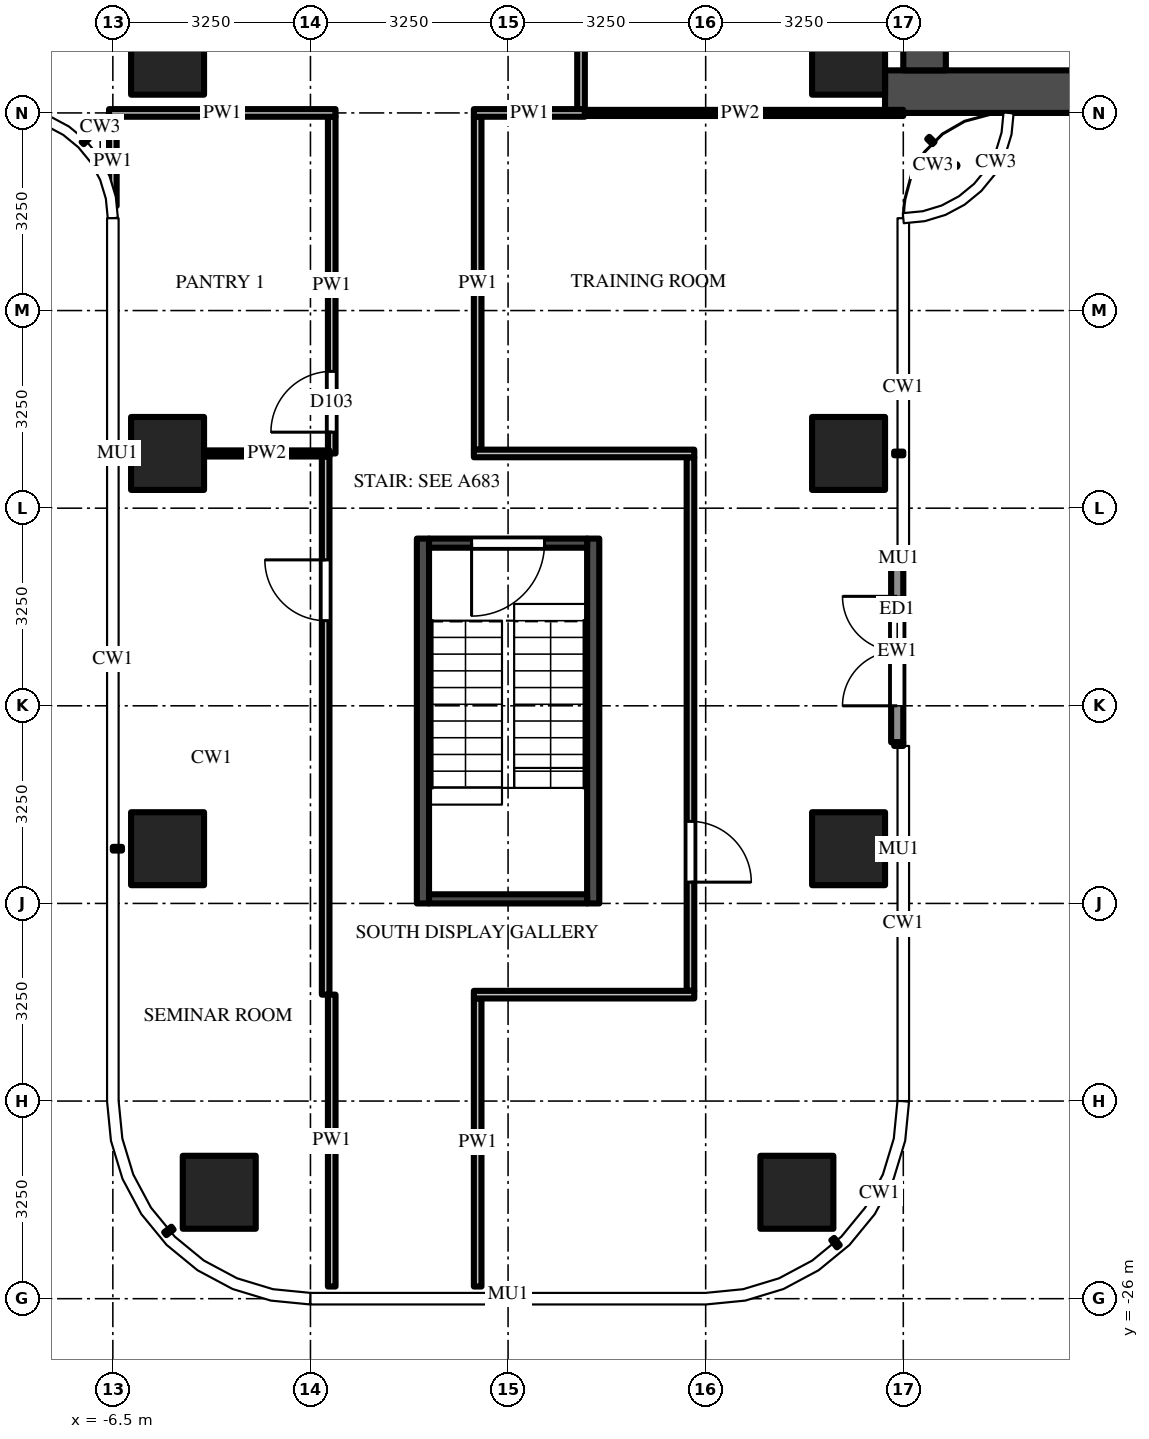
"""IFC4 building model, lengths in metres.
Left out: names, types, materials, properties, quantities, classifications, styles, units other than length and angle.
Written with IfcOpenShell. Run it as: python <this file> out.ifc"""

import sys

from ifc_helpers import new_model, si_unit, direction, frame, frame_2d, origin, origin_2d, place, context, subcontext, project, spatial, rectangle, extrude, source, transform, mapped, element, fill, save


model = new_model("IFC4")
c1 = context("Model", 3, precision=1e-05, world=origin(), true_north=direction((0.0, 1.0)))
c2 = subcontext(c1, "Body", "Model", "MODEL_VIEW")
j1 = project(units=[si_unit("LENGTHUNIT", "METRE"), si_unit("PLANEANGLEUNIT", "RADIAN")], contexts=[c1])
p1 = place(None, origin())
s1 = spatial("IfcSite", under=j1, at=p1, CompositionType="ELEMENT")
p2 = place(p1, origin())
s2 = spatial("IfcBuilding", under=s1, at=p2, CompositionType="ELEMENT")
p3 = place(p2, frame((0.0, 0.0, 162.0)))
s3 = spatial("IfcBuildingStorey", under=s2, at=p3, CompositionType="ELEMENT", Elevation=162.0)
m1 = source(origin(), c2, "Body", "SweptSolid", [
    extrude(rectangle(XDim=1.2, YDim=1.2, at=origin_2d()), origin(), (0.0, 0.0, 1.0), 3.9),
])
for number, where, z_axis, x_axis in (
    (1, (5.6, -5.6, 0.0), (0.0, 0.0, 1.0), (1.0, 0.0, 0.0)),
    (2, (-5.6, -5.6, 0.0), (0.0, 0.0, 1.0), (1.0, 0.0, 0.0)),
    (3, (5.6, -12.1, 0.0), (0.0, 0.0, 1.0), (1.0, 0.0, 0.0)),
    (4, (5.6, -18.6, 0.0), (0.0, 0.0, 1.0), (1.0, 0.0, 0.0)),
    (5, (4.75, -24.25, 0.0), (0.0, 0.0, 1.0), (1.0, 0.0, 0.0)),
    (6, (-5.6, -12.1, 0.0), (0.0, 0.0, 1.0), (1.0, 0.0, 0.0)),
    (7, (-5.6, -18.6, 0.0), (0.0, 0.0, 1.0), (1.0, 0.0, 0.0)),
    (8, (-4.75, -24.25, 0.0), (0.0, 0.0, 1.0), (1.0, 0.0, 0.0)),
):
    element("IfcColumn", number, at=place(p3, frame(where, z_axis=z_axis, x_axis=x_axis)), inside=s3, PredefinedType="COLUMN", context=c2, shape_type="MappedRepresentation", body=[
        mapped(m1, transform((0.0, 0.0, 0.0))),
    ])
m2 = source(origin(), c2, "Body", "SweptSolid", [
    extrude(rectangle(XDim=16.55, YDim=0.7, at=frame_2d((8.275, 0.0))), origin(), (0.0, 0.0, 1.0), 3.7),
])
p4 = place(p3, frame((6.2, -6.15, 0.0), z_axis=(0.0, 0.0, 1.0), x_axis=(1.0, 0.0, 0.0)))
e9 = element("IfcWall", 9, at=p4, inside=s3, PredefinedType="SHEAR", context=c2, shape_type="MappedRepresentation", body=[
    mapped(m2, transform((0.0, 0.0, 0.0))),
])
m3 = source(origin(), c2, "Body", "SweptSolid", [
    extrude(rectangle(XDim=9.05, YDim=0.7, at=frame_2d((4.525, 0.0))), origin(), (0.0, 0.0, 1.0), 3.7),
])
p5 = place(p3, frame((6.85, -5.8, 0.0), z_axis=(0.0, 0.0, 1.0), x_axis=(0.0, 1.0, 0.0)))
e10 = element("IfcWall", 10, at=p5, inside=s3, PredefinedType="SHEAR", context=c2, shape_type="MappedRepresentation", body=[
    mapped(m3, transform((0.0, 0.0, 0.0))),
])
m4 = source(origin(), c2, "Body", "SweptSolid", [
    extrude(rectangle(XDim=1.8, YDim=2.1, at=frame_2d((0.9, 1.05))), frame((0.0, 0.36, 0.0), z_axis=(0.0, -1.0, 0.0), x_axis=(1.0, 0.0, 0.0)), (0.0, 0.0, 1.0), 0.72),
])
p6 = place(p5, frame((3.15, 0.0, 0.0)))
e11 = element("IfcOpeningElement", 11, at=p6, cuts=e10, PredefinedType="OPENING", context=c2, shape_type="MappedRepresentation", body=[
    mapped(m4, transform((0.0, 0.0, 0.0))),
])
m5 = source(origin(), c2, "Body", "SweptSolid", [
    extrude(rectangle(XDim=6.0, YDim=0.2, at=frame_2d((3.0, 0.0))), origin(), (0.0, 0.0, 1.0), 3.7),
])
for number, where, z_axis, x_axis in (
    (12, (1.4, -13.5, 0.0), (0.0, 0.0, 1.0), (0.0, -1.0, 0.0)),
    (13, (-1.4, -13.5, 0.0), (0.0, 0.0, 1.0), (0.0, -1.0, 0.0)),
):
    element("IfcWall", number, at=place(p3, frame(where, z_axis=z_axis, x_axis=x_axis)), inside=s3, PredefinedType="SHEAR", context=c2, shape_type="MappedRepresentation", body=[
        mapped(m5, transform((0.0, 0.0, 0.0))),
    ])
m6 = source(origin(), c2, "Body", "SweptSolid", [
    extrude(rectangle(XDim=2.6, YDim=0.15, at=frame_2d((1.3, 0.0))), origin(), (0.0, 0.0, 1.0), 3.7),
])
p7 = place(p3, frame((1.3, -13.575, 0.0), z_axis=(0.0, 0.0, 1.0), x_axis=(-1.0, 0.0, 0.0)))
e14 = element("IfcWall", 14, at=p7, inside=s3, PredefinedType="SHEAR", context=c2, shape_type="MappedRepresentation", body=[
    mapped(m6, transform((0.0, 0.0, 0.0))),
])
m7 = source(origin(), c2, "Body", "SweptSolid", [
    extrude(rectangle(XDim=1.2, YDim=2.1, at=frame_2d((0.6, 1.05))), frame((0.0, 0.085, 0.0), z_axis=(0.0, -1.0, 0.0), x_axis=(1.0, 0.0, 0.0)), (0.0, 0.0, 1.0), 0.17),
])
p8 = place(p7, frame((0.7, 0.0, 0.0)))
e15 = element("IfcOpeningElement", 15, at=p8, cuts=e14, PredefinedType="OPENING", context=c2, shape_type="MappedRepresentation", body=[
    mapped(m7, transform((0.0, 0.0, 0.0))),
])
p9 = place(p3, frame((1.3, -19.425, 0.0), z_axis=(0.0, 0.0, 1.0), x_axis=(-1.0, 0.0, 0.0)))
e16 = element("IfcWall", 16, at=p9, inside=s3, PredefinedType="SHEAR", context=c2, shape_type="MappedRepresentation", body=[
    mapped(m6, transform((0.0, 0.0, 0.0))),
])
m8 = source(origin(), c2, "Body", "SweptSolid", [
    extrude(rectangle(XDim=3.0, YDim=0.2, at=frame_2d((1.5, 0.0))), origin(), (0.0, 0.0, 1.0), 3.7),
])
p10 = place(p3, frame((6.4, -16.85, 0.0), z_axis=(0.0, 0.0, 1.0), x_axis=(0.0, 1.0, 0.0)))
e17 = element("IfcWall", 17, at=p10, inside=s3, PredefinedType="SOLIDWALL", context=c2, shape_type="MappedRepresentation", body=[
    mapped(m8, transform((0.0, 0.0, 0.0))),
])
m9 = source(origin(), c2, "Body", "SweptSolid", [
    extrude(rectangle(XDim=1.8, YDim=2.4, at=frame_2d((0.9, 1.2))), frame((0.0, 0.11, 0.0), z_axis=(0.0, -1.0, 0.0), x_axis=(1.0, 0.0, 0.0)), (0.0, 0.0, 1.0), 0.22),
])
p11 = place(p10, frame((0.6, 0.0, 0.0)))
e18 = element("IfcOpeningElement", 18, at=p11, cuts=e17, PredefinedType="OPENING", context=c2, shape_type="MappedRepresentation", body=[
    mapped(m9, transform((0.0, 0.0, 0.0))),
])
m10 = source(origin(), c2, "Body", "SweptSolid", [
    extrude(rectangle(XDim=1.469, YDim=0.125, at=frame_2d((0.734, 0.0))), origin(), (0.0, 0.0, 1.0), 3.7),
])
p12 = place(p3, frame((-6.5, -6.562, 0.0), z_axis=(0.0, 0.0, 1.0), x_axis=(0.0, -1.0, 0.0)))
e19 = element("IfcWall", 19, at=p12, inside=s3, PredefinedType="PARTITIONING", context=c2, shape_type="MappedRepresentation", body=[
    mapped(m10, transform((0.0, 0.0, 0.0))),
])
m11 = source(origin(), c2, "Body", "SweptSolid", [
    extrude(rectangle(XDim=8.85, YDim=0.125, at=frame_2d((4.425, 0.0))), origin(), (0.0, 0.0, 1.0), 2.997),
])
p13 = place(p3, frame((-3.0, -21.0, 0.0), z_axis=(0.0, 0.0, 1.0), x_axis=(0.0, 1.0, 0.0)))
e20 = element("IfcWall", 20, at=p13, inside=s3, PredefinedType="PARTITIONING", context=c2, shape_type="MappedRepresentation", body=[
    mapped(m11, transform((0.0, 0.0, 0.0))),
])
m12 = source(origin(), c2, "Body", "SweptSolid", [
    extrude(rectangle(XDim=1.0, YDim=2.1, at=frame_2d((0.5, 1.05))), frame((0.0, 0.073, 0.0), z_axis=(0.0, -1.0, 0.0), x_axis=(1.0, 0.0, 0.0)), (0.0, 0.0, 1.0), 0.145),
])
p14 = place(p13, frame((6.15, 0.0, 0.0)))
e21 = element("IfcOpeningElement", 21, at=p14, cuts=e20, PredefinedType="OPENING", context=c2, shape_type="MappedRepresentation", body=[
    mapped(m12, transform((0.0, 0.0, 0.0))),
])
m13 = source(origin(), c2, "Body", "SweptSolid", [
    extrude(rectangle(XDim=4.8, YDim=0.125, at=frame_2d((2.4, 0.0))), origin(), (0.0, 0.0, 1.0), 2.78),
])
p15 = place(p3, frame((-2.9, -25.8, 0.0), z_axis=(0.0, 0.0, 1.0), x_axis=(0.0, 1.0, 0.0)))
e22 = element("IfcWall", 22, at=p15, inside=s3, PredefinedType="PARTITIONING", context=c2, shape_type="MappedRepresentation", body=[
    mapped(m13, transform((0.0, 0.0, 0.0))),
])
m14 = source(origin(), c2, "Body", "SweptSolid", [
    extrude(rectangle(XDim=5.538, YDim=0.125, at=frame_2d((2.769, 0.0))), origin(), (0.0, 0.0, 1.0), 2.997),
])
p16 = place(p3, frame((-2.9, -12.1, 0.0), z_axis=(0.0, 0.0, 1.0), x_axis=(0.0, 1.0, 0.0)))
e23 = element("IfcWall", 23, at=p16, inside=s3, PredefinedType="PARTITIONING", context=c2, shape_type="MappedRepresentation", body=[
    mapped(m14, transform((0.0, 0.0, 0.0))),
])
p17 = place(p16, frame((0.35, 0.0, 0.0)))
e24 = element("IfcOpeningElement", 24, at=p17, cuts=e23, PredefinedType="OPENING", context=c2, shape_type="MappedRepresentation", body=[
    mapped(m12, transform((0.0, 0.0, 0.0))),
])
m15 = source(origin(), c2, "Body", "SweptSolid", [
    extrude(rectangle(XDim=4.738, YDim=0.125, at=frame_2d((2.369, 0.0))), origin(), (0.0, 0.0, 1.0), 2.78),
])
p18 = place(p3, frame((-0.5, -21.062, 0.0), z_axis=(0.0, 0.0, 1.0), x_axis=(0.0, -1.0, 0.0)))
e25 = element("IfcWall", 25, at=p18, inside=s3, PredefinedType="PARTITIONING", context=c2, shape_type="MappedRepresentation", body=[
    mapped(m15, transform((0.0, 0.0, 0.0))),
])
m16 = source(origin(), c2, "Body", "SweptSolid", [
    extrude(rectangle(XDim=5.475, YDim=0.125, at=frame_2d((2.738, 0.0))), origin(), (0.0, 0.0, 1.0), 2.997),
])
p19 = place(p3, frame((-0.5, -6.562, 0.0), z_axis=(0.0, 0.0, 1.0), x_axis=(0.0, -1.0, 0.0)))
e26 = element("IfcWall", 26, at=p19, inside=s3, PredefinedType="PARTITIONING", context=c2, shape_type="MappedRepresentation", body=[
    mapped(m16, transform((0.0, 0.0, 0.0))),
])
m17 = source(origin(), c2, "Body", "SweptSolid", [
    extrude(rectangle(XDim=3.137, YDim=0.125, at=frame_2d((1.569, 0.0))), origin(), (0.0, 0.0, 1.0), 2.997),
])
p20 = place(p3, frame((1.2, -3.312, 0.0), z_axis=(0.0, 0.0, 1.0), x_axis=(0.0, -1.0, 0.0)))
e27 = element("IfcWall", 27, at=p20, inside=s3, PredefinedType="PARTITIONING", context=c2, shape_type="MappedRepresentation", body=[
    mapped(m17, transform((0.0, 0.0, 0.0))),
])
m18 = source(origin(), c2, "Body", "SweptSolid", [
    extrude(rectangle(XDim=8.775, YDim=0.125, at=frame_2d((4.387, 0.0))), origin(), (0.0, 0.0, 1.0), 2.997),
])
p21 = place(p3, frame((3.0, -12.163, 0.0), z_axis=(0.0, 0.0, 1.0), x_axis=(0.0, -1.0, 0.0)))
e28 = element("IfcWall", 28, at=p21, inside=s3, PredefinedType="PARTITIONING", context=c2, shape_type="MappedRepresentation", body=[
    mapped(m18, transform((0.0, 0.0, 0.0))),
])
p22 = place(p21, frame((5.988, 0.0, 0.0)))
e29 = element("IfcOpeningElement", 29, at=p22, cuts=e28, PredefinedType="OPENING", context=c2, shape_type="MappedRepresentation", body=[
    mapped(m12, transform((0.0, 0.0, 0.0))),
])
m19 = source(origin(), c2, "Body", "SweptSolid", [
    extrude(rectangle(XDim=3.625, YDim=0.125, at=frame_2d((1.812, 0.0))), origin(), (0.0, 0.0, 1.0), 3.7),
])
p23 = place(p3, frame((3.062, -21.0, 0.0), z_axis=(0.0, 0.0, 1.0), x_axis=(-1.0, 0.0, 0.0)))
e30 = element("IfcWall", 30, at=p23, inside=s3, PredefinedType="PARTITIONING", context=c2, shape_type="MappedRepresentation", body=[
    mapped(m19, transform((0.0, 0.0, 0.0))),
])
m20 = source(origin(), c2, "Body", "SweptSolid", [
    extrude(rectangle(XDim=2.062, YDim=0.1, at=frame_2d((1.031, 0.0))), origin(), (0.0, 0.0, 1.0), 2.997),
])
p24 = place(p3, frame((-5.0, -12.1, 0.0), z_axis=(0.0, 0.0, 1.0), x_axis=(1.0, 0.0, 0.0)))
e31 = element("IfcWall", 31, at=p24, inside=s3, PredefinedType="PARTITIONING", context=c2, shape_type="MappedRepresentation", body=[
    mapped(m20, transform((0.0, 0.0, 0.0))),
])
m21 = source(origin(), c2, "Body", "SweptSolid", [
    extrude(rectangle(XDim=3.625, YDim=0.125, at=frame_2d((1.812, 0.0))), origin(), (0.0, 0.0, 1.0), 2.997),
])
p25 = place(p3, frame((-0.562, -12.1, 0.0), z_axis=(0.0, 0.0, 1.0), x_axis=(1.0, 0.0, 0.0)))
e32 = element("IfcWall", 32, at=p25, inside=s3, PredefinedType="PARTITIONING", context=c2, shape_type="MappedRepresentation", body=[
    mapped(m21, transform((0.0, 0.0, 0.0))),
])
m22 = source(origin(), c2, "Body", "SweptSolid", [
    extrude(rectangle(XDim=5.363, YDim=0.1, at=frame_2d((2.681, 0.0))), origin(), (0.0, 0.0, 1.0), 2.78),
])
p26 = place(p3, frame((1.137, -6.5, 0.0), z_axis=(0.0, 0.0, 1.0), x_axis=(1.0, 0.0, 0.0)))
e33 = element("IfcWall", 33, at=p26, inside=s3, PredefinedType="PARTITIONING", context=c2, shape_type="MappedRepresentation", body=[
    mapped(m22, transform((0.0, 0.0, 0.0))),
])
m23 = source(origin(), c2, "Body", "SweptSolid", [
    extrude(rectangle(XDim=3.725, YDim=0.125, at=frame_2d((1.863, 0.0))), origin(), (0.0, 0.0, 1.0), 2.78),
])
p27 = place(p3, frame((-2.837, -6.5, 0.0), z_axis=(0.0, 0.0, 1.0), x_axis=(-1.0, 0.0, 0.0)))
e34 = element("IfcWall", 34, at=p27, inside=s3, PredefinedType="PARTITIONING", context=c2, shape_type="MappedRepresentation", body=[
    mapped(m23, transform((0.0, 0.0, 0.0))),
])
m24 = source(origin(), c2, "Body", "SweptSolid", [
    extrude(rectangle(XDim=1.825, YDim=0.125, at=frame_2d((0.913, 0.0))), origin(), (0.0, 0.0, 1.0), 3.7),
])
p28 = place(p3, frame((1.262, -6.5, 0.0), z_axis=(0.0, 0.0, 1.0), x_axis=(-1.0, 0.0, 0.0)))
e35 = element("IfcWall", 35, at=p28, inside=s3, PredefinedType="PARTITIONING", context=c2, shape_type="MappedRepresentation", body=[
    mapped(m24, transform((0.0, 0.0, 0.0))),
])
m25 = source(origin(), c2, "Body", "SweptSolid", [
    extrude(rectangle(XDim=1.2, YDim=2.1, at=frame_2d((0.6, 1.05))), frame((0.0, 0.025, 0.0), z_axis=(0.0, -1.0, 0.0), x_axis=(1.0, 0.0, 0.0)), (0.0, 0.0, 1.0), 0.05),
])
p29 = place(p8, origin())
e36 = element("IfcDoor", 36, at=p29, inside=s3, OperationType="SINGLE_SWING_RIGHT", PredefinedType="DOOR", context=c2, shape_type="MappedRepresentation", body=[
    mapped(m25, transform((0.0, 0.0, 0.0))),
])
fill(e15, e36)
m26 = source(origin(), c2, "Body", "SweptSolid", [
    extrude(rectangle(XDim=1.8, YDim=2.4, at=frame_2d((0.9, 1.2))), frame((0.0, 0.025, 0.0), z_axis=(0.0, -1.0, 0.0), x_axis=(1.0, 0.0, 0.0)), (0.0, 0.0, 1.0), 0.05),
])
p30 = place(p11, origin())
e37 = element("IfcDoor", 37, at=p30, inside=s3, OperationType="DOUBLE_DOOR_SINGLE_SWING", PredefinedType="DOOR", context=c2, shape_type="MappedRepresentation", body=[
    mapped(m26, transform((0.0, 0.0, 0.0))),
])
fill(e18, e37)
m27 = source(origin(), c2, "Body", "SweptSolid", [
    extrude(rectangle(XDim=1.0, YDim=2.1, at=frame_2d((0.5, 1.05))), frame((0.0, 0.025, 0.0), z_axis=(0.0, -1.0, 0.0), x_axis=(1.0, 0.0, 0.0)), (0.0, 0.0, 1.0), 0.05),
])
p31 = place(p22, origin())
e38 = element("IfcDoor", 38, at=p31, inside=s3, OperationType="SINGLE_SWING_RIGHT", PredefinedType="DOOR", context=c2, shape_type="MappedRepresentation", body=[
    mapped(m27, transform((0.0, 0.0, 0.0))),
])
fill(e29, e38)
p32 = place(p14, origin())
e39 = element("IfcDoor", 39, at=p32, inside=s3, OperationType="SINGLE_SWING_RIGHT", PredefinedType="DOOR", context=c2, shape_type="MappedRepresentation", body=[
    mapped(m27, transform((0.0, 0.0, 0.0))),
])
fill(e21, e39)
p33 = place(p17, origin())
e40 = element("IfcDoor", 40, at=p33, inside=s3, OperationType="SINGLE_SWING_LEFT", PredefinedType="DOOR", context=c2, shape_type="MappedRepresentation", body=[
    mapped(m27, transform((0.0, 0.0, 0.0))),
])
fill(e24, e40)
save(model, sys.argv[1])
